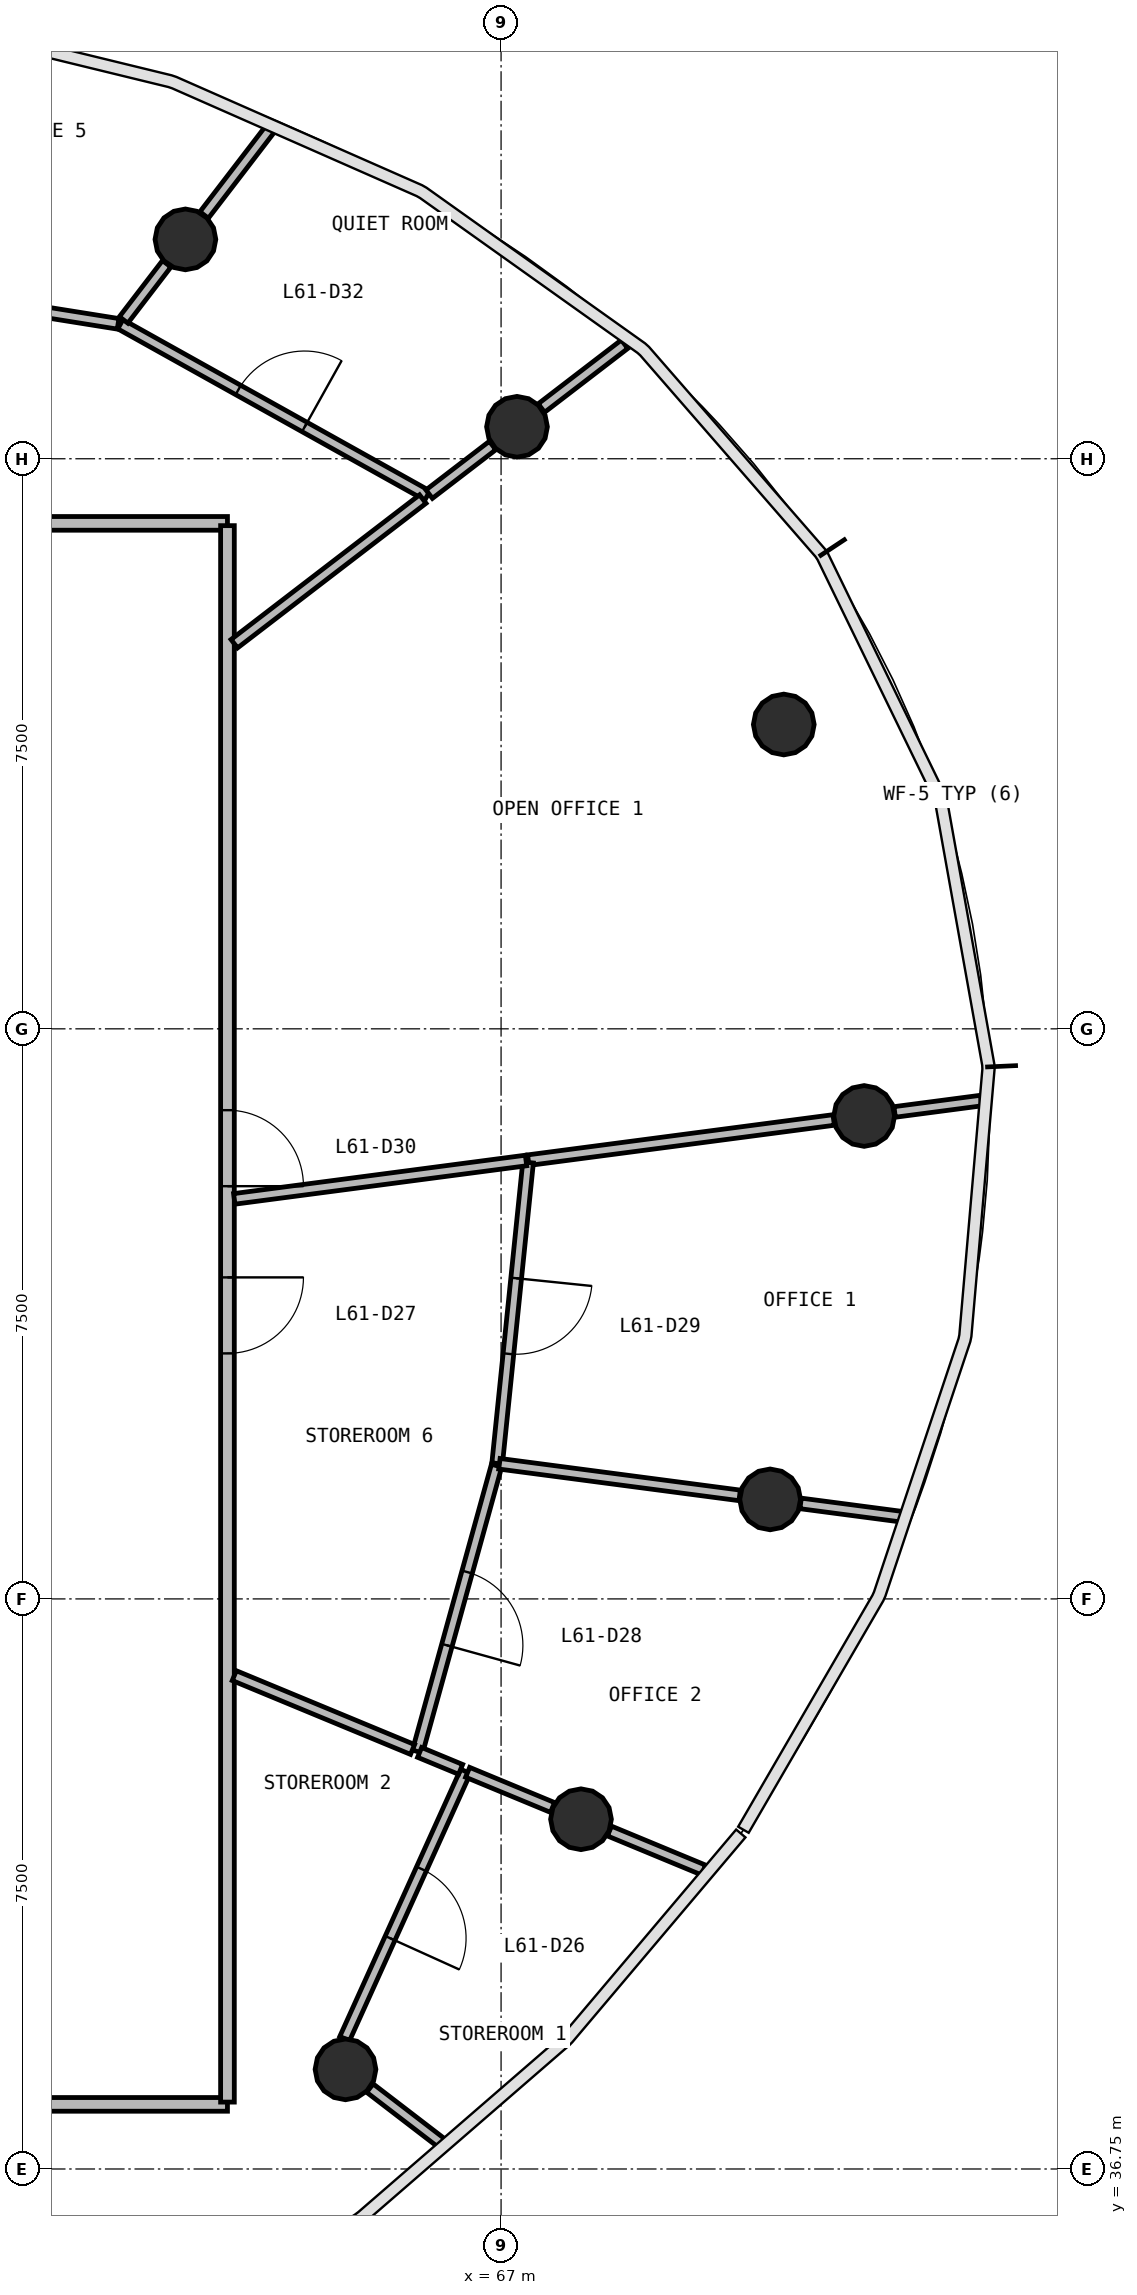
"""IFC4 building model, lengths in metres.
Left out: names, types, materials, properties, quantities, classifications, styles, units other than length and angle.
Written with IfcOpenShell. Run it as: python <this file> out.ifc"""

import sys

from ifc_helpers import new_model, si_unit, direction, frame, frame_2d, origin, origin_2d, place, context, subcontext, project, spatial, rectangle, circle, extrude, source, transform, mapped, element, fill, save


model = new_model("IFC4")
c1 = context("Model", 3, precision=1e-05, world=origin(), true_north=direction((0.0, 1.0)))
c2 = subcontext(c1, "Body", "Model", "MODEL_VIEW")
j1 = project(units=[si_unit("LENGTHUNIT", "METRE"), si_unit("PLANEANGLEUNIT", "RADIAN")], contexts=[c1])
p1 = place(None, origin())
s1 = spatial("IfcSite", under=j1, at=p1, CompositionType="ELEMENT")
p2 = place(p1, origin())
s2 = spatial("IfcBuilding", under=s1, at=p2, CompositionType="ELEMENT")
p3 = place(p2, frame((0.0, 0.0, 250.1)))
s3 = spatial("IfcBuildingStorey", under=s2, at=p3, CompositionType="ELEMENT", Elevation=250.1)
m1 = source(origin(), c2, "Body", "SweptSolid", [
    extrude(circle(Radius=0.4, at=origin_2d()), origin(), (0.0, 0.0, 1.0), 3.9),
])
for number, where, z_axis, x_axis in (
    (1, (71.777, 50.604, 0.0), (0.0, 0.0, 1.0), (1.0, 0.0, 0.0)),
    (2, (70.719, 55.754, 0.0), (0.0, 0.0, 1.0), (1.0, 0.0, 0.0)),
    (3, (67.209, 59.671, 0.0), (0.0, 0.0, 1.0), (1.0, 0.0, 0.0)),
    (4, (62.847, 62.136, 0.0), (0.0, 0.0, 1.0), (1.0, 0.0, 0.0)),
    (5, (64.953, 38.061, 0.0), (0.0, 0.0, 1.0), (1.0, 0.0, 0.0)),
    (6, (68.052, 41.351, 0.0), (0.0, 0.0, 1.0), (1.0, 0.0, 0.0)),
    (7, (70.54, 45.559, 0.0), (0.0, 0.0, 1.0), (1.0, 0.0, 0.0)),
):
    element("IfcColumn", number, at=place(p3, frame(where, z_axis=z_axis, x_axis=x_axis)), inside=s3, PredefinedType="COLUMN", context=c2, shape_type="MappedRepresentation", body=[
        mapped(m1, transform((0.0, 0.0, 0.0), scale=1.0)),
    ])
p4 = place(p3, frame((40.6, 58.4, 0.0), z_axis=(0.0, 0.0, 1.0), x_axis=(1.0, 0.0, 0.0)))
e8 = element("IfcWall", 8, at=p4, inside=s3, PredefinedType="PARTITIONING", context=c2, shape_type="SweptSolid", body=[
    extrude(rectangle(XDim=22.8, YDim=0.18, at=frame_2d((11.4, 0.0))), origin(), (0.0, 0.0, 1.0), 2.88),
])
p5 = place(p4, frame((16.15, 0.0, 0.0)))
e9 = element("IfcOpeningElement", 9, at=p5, cuts=e8, PredefinedType="OPENING", context=c2, shape_type="SweptSolid", body=[
    extrude(rectangle(XDim=1.0, YDim=2.1, at=frame_2d((0.5, 1.05))), frame((0.0, 0.1, 0.0), z_axis=(0.0, -1.0, 0.0), x_axis=(1.0, 0.0, 0.0)), (0.0, 0.0, 1.0), 0.2),
])
p6 = place(p4, frame((10.95, 0.0, 0.0)))
e10 = element("IfcOpeningElement", 10, at=p6, cuts=e8, PredefinedType="OPENING", context=c2, shape_type="SweptSolid", body=[
    extrude(rectangle(XDim=1.0, YDim=2.1, at=frame_2d((0.5, 1.05))), frame((0.0, 0.1, 0.0), z_axis=(0.0, -1.0, 0.0), x_axis=(1.0, 0.0, 0.0)), (0.0, 0.0, 1.0), 0.2),
])
p7 = place(p4, frame((8.75, 0.0, 0.0)))
e11 = element("IfcOpeningElement", 11, at=p7, cuts=e8, PredefinedType="OPENING", context=c2, shape_type="SweptSolid", body=[
    extrude(rectangle(XDim=1.0, YDim=2.1, at=frame_2d((0.5, 1.05))), frame((0.0, 0.1, 0.0), z_axis=(0.0, -1.0, 0.0), x_axis=(1.0, 0.0, 0.0)), (0.0, 0.0, 1.0), 0.2),
])
p8 = place(p3, frame((63.4, 37.6, 0.0), z_axis=(0.0, 0.0, 1.0), x_axis=(-1.0, 0.0, 0.0)))
e12 = element("IfcWall", 12, at=p8, inside=s3, PredefinedType="PARTITIONING", context=c2, shape_type="SweptSolid", body=[
    extrude(rectangle(XDim=22.8, YDim=0.18, at=frame_2d((11.4, 0.0))), origin(), (0.0, 0.0, 1.0), 2.88),
])
p9 = place(p8, frame((19.95, 0.0, 0.0)))
e13 = element("IfcOpeningElement", 13, at=p9, cuts=e12, PredefinedType="OPENING", context=c2, shape_type="SweptSolid", body=[
    extrude(rectangle(XDim=1.0, YDim=2.1, at=frame_2d((0.5, 1.05))), frame((0.0, 0.1, 0.0), z_axis=(0.0, -1.0, 0.0), x_axis=(1.0, 0.0, 0.0)), (0.0, 0.0, 1.0), 0.2),
])
p10 = place(p8, frame((10.95, 0.0, 0.0)))
e14 = element("IfcOpeningElement", 14, at=p10, cuts=e12, PredefinedType="OPENING", context=c2, shape_type="SweptSolid", body=[
    extrude(rectangle(XDim=1.0, YDim=2.1, at=frame_2d((0.5, 1.05))), frame((0.0, 0.1, 0.0), z_axis=(0.0, -1.0, 0.0), x_axis=(1.0, 0.0, 0.0)), (0.0, 0.0, 1.0), 0.2),
])
p11 = place(p8, frame((5.75, 0.0, 0.0)))
e15 = element("IfcOpeningElement", 15, at=p11, cuts=e12, PredefinedType="OPENING", context=c2, shape_type="SweptSolid", body=[
    extrude(rectangle(XDim=1.0, YDim=2.1, at=frame_2d((0.5, 1.05))), frame((0.0, 0.1, 0.0), z_axis=(0.0, -1.0, 0.0), x_axis=(1.0, 0.0, 0.0)), (0.0, 0.0, 1.0), 0.2),
])
p12 = place(p3, frame((63.4, 58.37, 0.0), z_axis=(0.0, 0.0, 1.0), x_axis=(0.0, -1.0, 0.0)))
e16 = element("IfcWall", 16, at=p12, inside=s3, PredefinedType="PARTITIONING", context=c2, shape_type="SweptSolid", body=[
    extrude(rectangle(XDim=20.74, YDim=0.18, at=frame_2d((10.37, 0.0))), origin(), (0.0, 0.0, 1.0), 2.88),
])
p13 = place(p12, frame((9.89, 0.0, 0.0)))
e17 = element("IfcOpeningElement", 17, at=p13, cuts=e16, PredefinedType="OPENING", context=c2, shape_type="SweptSolid", body=[
    extrude(rectangle(XDim=1.0, YDim=2.1, at=frame_2d((0.5, 1.05))), frame((0.0, 0.1, 0.0), z_axis=(0.0, -1.0, 0.0), x_axis=(1.0, 0.0, 0.0)), (0.0, 0.0, 1.0), 0.2),
])
p14 = place(p12, frame((7.69, 0.0, 0.0)))
e18 = element("IfcOpeningElement", 18, at=p14, cuts=e16, PredefinedType="OPENING", context=c2, shape_type="SweptSolid", body=[
    extrude(rectangle(XDim=1.0, YDim=2.1, at=frame_2d((0.5, 1.05))), frame((0.0, 0.1, 0.0), z_axis=(0.0, -1.0, 0.0), x_axis=(1.0, 0.0, 0.0)), (0.0, 0.0, 1.0), 0.2),
])
p15 = place(p3, frame((61.991, 61.02, 0.0), z_axis=(0.0, 0.0, 1.0), x_axis=(0.873219638233, -0.487326854795, 0.0)))
e19 = element("IfcWall", 19, at=p15, inside=s3, PredefinedType="PARTITIONING", context=c2, shape_type="SweptSolid", body=[
    extrude(rectangle(XDim=4.626, YDim=0.14, at=frame_2d((2.313, 0.0))), origin(), (0.0, 0.0, 1.0), 2.88),
])
p16 = place(p15, frame((1.776, 0.0, 0.0)))
e20 = element("IfcOpeningElement", 20, at=p16, cuts=e19, PredefinedType="OPENING", context=c2, shape_type="SweptSolid", body=[
    extrude(rectangle(XDim=1.0, YDim=2.1, at=frame_2d((0.5, 1.05))), frame((0.0, 0.08, 0.0), z_axis=(0.0, -1.0, 0.0), x_axis=(1.0, 0.0, 0.0)), (0.0, 0.0, 1.0), 0.16),
])
p17 = place(p3, frame((57.678, 61.709, 0.0), z_axis=(0.0, 0.0, 1.0), x_axis=(0.987490815334, -0.157676534816, 0.0)))
e21 = element("IfcWall", 21, at=p17, inside=s3, PredefinedType="PARTITIONING", context=c2, shape_type="SweptSolid", body=[
    extrude(rectangle(XDim=4.337, YDim=0.14, at=frame_2d((2.168, 0.0))), origin(), (0.0, 0.0, 1.0), 2.88),
])
p18 = place(p17, frame((1.687, 0.0, 0.0)))
e22 = element("IfcOpeningElement", 22, at=p18, cuts=e21, PredefinedType="OPENING", context=c2, shape_type="SweptSolid", body=[
    extrude(rectangle(XDim=1.0, YDim=2.1, at=frame_2d((0.5, 1.05))), frame((0.0, 0.08, 0.0), z_axis=(0.0, -1.0, 0.0), x_axis=(1.0, 0.0, 0.0)), (0.0, 0.0, 1.0), 0.16),
])
p19 = place(p3, frame((67.358, 50.022, 0.0), z_axis=(0.0, 0.0, 1.0), x_axis=(0.991449578653, 0.130490355919, 0.0)))
e23 = element("IfcWall", 23, at=p19, inside=s3, PredefinedType="PARTITIONING", context=c2, shape_type="SweptSolid", body=[
    extrude(rectangle(XDim=4.052, YDim=0.14, at=frame_2d((2.026, 0.0))), origin(), (0.0, 0.0, 1.0), 2.88),
])
p20 = place(p3, frame((67.355, 49.992, 0.0), z_axis=(0.0, 0.0, 1.0), x_axis=(-0.102108226225, -0.99477329585, 0.0)))
e24 = element("IfcWall", 24, at=p20, inside=s3, PredefinedType="PARTITIONING", context=c2, shape_type="SweptSolid", body=[
    extrude(rectangle(XDim=3.981, YDim=0.14, at=frame_2d((1.99, 0.0))), origin(), (0.0, 0.0, 1.0), 2.88),
])
p21 = place(p20, frame((1.531, 0.0, 0.0)))
e25 = element("IfcOpeningElement", 25, at=p21, cuts=e24, PredefinedType="OPENING", context=c2, shape_type="SweptSolid", body=[
    extrude(rectangle(XDim=1.0, YDim=2.1, at=frame_2d((0.5, 1.05))), frame((0.0, 0.08, 0.0), z_axis=(0.0, -1.0, 0.0), x_axis=(1.0, 0.0, 0.0)), (0.0, 0.0, 1.0), 0.16),
])
p22 = place(p3, frame((63.49, 49.513, 0.0), z_axis=(0.0, 0.0, 1.0), x_axis=(0.991444634679, 0.130527914125, 0.0)))
e26 = element("IfcWall", 26, at=p22, inside=s3, PredefinedType="PARTITIONING", context=c2, shape_type="SweptSolid", body=[
    extrude(rectangle(XDim=3.872, YDim=0.14, at=frame_2d((1.936, 0.0))), origin(), (0.0, 0.0, 1.0), 2.88),
])
p23 = place(p3, frame((66.941, 46.003, 0.0), z_axis=(0.0, 0.0, 1.0), x_axis=(-0.266530407872, -0.963826510156, 0.0)))
e27 = element("IfcWall", 27, at=p23, inside=s3, PredefinedType="PARTITIONING", context=c2, shape_type="SweptSolid", body=[
    extrude(rectangle(XDim=3.902, YDim=0.14, at=frame_2d((1.951, 0.0))), origin(), (0.0, 0.0, 1.0), 2.88),
])
p24 = place(p23, frame((1.452, 0.0, 0.0)))
e28 = element("IfcOpeningElement", 28, at=p24, cuts=e27, PredefinedType="OPENING", context=c2, shape_type="SweptSolid", body=[
    extrude(rectangle(XDim=1.0, YDim=2.1, at=frame_2d((0.5, 1.05))), frame((0.0, 0.08, 0.0), z_axis=(0.0, -1.0, 0.0), x_axis=(1.0, 0.0, 0.0)), (0.0, 0.0, 1.0), 0.16),
])
p25 = place(p3, frame((66.532, 41.98, 0.0), z_axis=(0.0, 0.0, 1.0), x_axis=(-0.412147858133, -0.911116975496, 0.0)))
e29 = element("IfcWall", 29, at=p25, inside=s3, PredefinedType="PARTITIONING", context=c2, shape_type="SweptSolid", body=[
    extrude(rectangle(XDim=3.858, YDim=0.14, at=frame_2d((1.929, 0.0))), origin(), (0.0, 0.0, 1.0), 2.88),
])
p26 = place(p25, frame((1.408, 0.0, 0.0)))
e30 = element("IfcOpeningElement", 30, at=p26, cuts=e29, PredefinedType="OPENING", context=c2, shape_type="SweptSolid", body=[
    extrude(rectangle(XDim=1.0, YDim=2.1, at=frame_2d((0.5, 1.05))), frame((0.0, 0.08, 0.0), z_axis=(0.0, -1.0, 0.0), x_axis=(1.0, 0.0, 0.0)), (0.0, 0.0, 1.0), 0.16),
])
p27 = place(p3, frame((63.49, 56.817, 0.0), z_axis=(0.0, 0.0, 1.0), x_axis=(0.79337248494, 0.608736478404, 0.0)))
e31 = element("IfcWall", 31, at=p27, inside=s3, PredefinedType="PARTITIONING", context=c2, shape_type="SweptSolid", body=[
    extrude(rectangle(XDim=3.126, YDim=0.14, at=frame_2d((1.563, 0.0))), origin(), (0.0, 0.0, 1.0), 2.88),
])
p28 = place(p3, frame((66.979, 46.028, 0.0), z_axis=(0.0, 0.0, 1.0), x_axis=(0.991447255609, -0.13050800491, 0.0)))
e32 = element("IfcWall", 32, at=p28, inside=s3, PredefinedType="PARTITIONING", context=c2, shape_type="SweptSolid", body=[
    extrude(rectangle(XDim=3.188, YDim=0.14, at=frame_2d((1.594, 0.0))), origin(), (0.0, 0.0, 1.0), 2.88),
])
p29 = place(p3, frame((63.49, 43.241, 0.0), z_axis=(0.0, 0.0, 1.0), x_axis=(0.923857420899, -0.382736810157, 0.0)))
e33 = element("IfcWall", 33, at=p29, inside=s3, PredefinedType="PARTITIONING", context=c2, shape_type="SweptSolid", body=[
    extrude(rectangle(XDim=2.539, YDim=0.14, at=frame_2d((1.27, 0.0))), origin(), (0.0, 0.0, 1.0), 2.88),
])
p30 = place(p3, frame((63.093, 62.457, 0.0), z_axis=(0.0, 0.0, 1.0), x_axis=(0.608682974902, 0.793413534082, 0.0)))
e34 = element("IfcWall", 34, at=p30, inside=s3, PredefinedType="PARTITIONING", context=c2, shape_type="SweptSolid", body=[
    extrude(rectangle(XDim=1.447, YDim=0.14, at=frame_2d((0.724, 0.0))), origin(), (0.0, 0.0, 1.0), 2.88),
])
p31 = place(p3, frame((67.531, 59.917, 0.0), z_axis=(0.0, 0.0, 1.0), x_axis=(0.793347091369, 0.608769572676, 0.0)))
e35 = element("IfcWall", 35, at=p31, inside=s3, PredefinedType="PARTITIONING", context=c2, shape_type="SweptSolid", body=[
    extrude(rectangle(XDim=1.38, YDim=0.14, at=frame_2d((0.69, 0.0))), origin(), (0.0, 0.0, 1.0), 2.88),
])
p32 = place(p3, frame((70.941, 45.506, 0.0), z_axis=(0.0, 0.0, 1.0), x_axis=(0.991453684747, -0.130459154536, 0.0)))
e36 = element("IfcWall", 36, at=p32, inside=s3, PredefinedType="PARTITIONING", context=c2, shape_type="SweptSolid", body=[
    extrude(rectangle(XDim=1.361, YDim=0.14, at=frame_2d((0.68, 0.0))), origin(), (0.0, 0.0, 1.0), 2.88),
])
p33 = place(p3, frame((68.426, 41.196, 0.0), z_axis=(0.0, 0.0, 1.0), x_axis=(0.923888145957, -0.382662637005, 0.0)))
e37 = element("IfcWall", 37, at=p33, inside=s3, PredefinedType="PARTITIONING", context=c2, shape_type="SweptSolid", body=[
    extrude(rectangle(XDim=1.341, YDim=0.14, at=frame_2d((0.67, 0.0))), origin(), (0.0, 0.0, 1.0), 2.88),
])
p34 = place(p3, frame((66.56, 41.969, 0.0), z_axis=(0.0, 0.0, 1.0), x_axis=(0.923839645741, -0.382779713358, 0.0)))
e38 = element("IfcWall", 38, at=p34, inside=s3, PredefinedType="PARTITIONING", context=c2, shape_type="SweptSolid", body=[
    extrude(rectangle(XDim=1.209, YDim=0.14, at=frame_2d((0.604, 0.0))), origin(), (0.0, 0.0, 1.0), 2.88),
])
p35 = place(p3, frame((65.274, 37.814, 0.0), z_axis=(0.0, 0.0, 1.0), x_axis=(0.793454460627, -0.608629623754, 0.0)))
e39 = element("IfcWall", 39, at=p35, inside=s3, PredefinedType="PARTITIONING", context=c2, shape_type="SweptSolid", body=[
    extrude(rectangle(XDim=1.19, YDim=0.14, at=frame_2d((0.595, 0.0))), origin(), (0.0, 0.0, 1.0), 2.88),
])
p36 = place(p3, frame((72.178, 50.656, 0.0), z_axis=(0.0, 0.0, 1.0), x_axis=(0.991431107299, 0.130630622292, 0.0)))
e40 = element("IfcWall", 40, at=p36, inside=s3, PredefinedType="PARTITIONING", context=c2, shape_type="SweptSolid", body=[
    extrude(rectangle(XDim=1.147, YDim=0.14, at=frame_2d((0.574, 0.0))), origin(), (0.0, 0.0, 1.0), 2.88),
])
p37 = place(p3, frame((66.054, 58.784, 0.0), z_axis=(0.0, 0.0, 1.0), x_axis=(0.793348442071, 0.608767812441, 0.0)))
e41 = element("IfcWall", 41, at=p37, inside=s3, PredefinedType="PARTITIONING", context=c2, shape_type="SweptSolid", body=[
    extrude(rectangle(XDim=1.052, YDim=0.14, at=frame_2d((0.526, 0.0))), origin(), (0.0, 0.0, 1.0), 2.88),
])
p38 = place(p3, frame((62.034, 61.076, 0.0), z_axis=(0.0, 0.0, 1.0), x_axis=(0.608734333178, 0.793374130919, 0.0)))
e42 = element("IfcWall", 42, at=p38, inside=s3, PredefinedType="PARTITIONING", context=c2, shape_type="SweptSolid", body=[
    extrude(rectangle(XDim=0.931, YDim=0.14, at=frame_2d((0.465, 0.0))), origin(), (0.0, 0.0, 1.0), 2.88),
])
p39 = place(p3, frame((65.928, 42.231, 0.0), z_axis=(0.0, 0.0, 1.0), x_axis=(0.923817916436, -0.382832152871, 0.0)))
e43 = element("IfcWall", 43, at=p39, inside=s3, PredefinedType="PARTITIONING", context=c2, shape_type="SweptSolid", body=[
    extrude(rectangle(XDim=0.583, YDim=0.14, at=frame_2d((0.292, 0.0))), origin(), (0.0, 0.0, 1.0), 2.88),
])
m2 = source(origin(), c2, "Body", "SweptSolid", [
    extrude(rectangle(XDim=1.0, YDim=2.1, at=frame_2d((0.5, 1.05))), frame((0.0, 0.025, 0.0), z_axis=(0.0, -1.0, 0.0), x_axis=(1.0, 0.0, 0.0)), (0.0, 0.0, 1.0), 0.05),
])
p40 = place(p26, origin())
e44 = element("IfcDoor", 44, at=p40, inside=s3, OperationType="SINGLE_SWING_RIGHT", PredefinedType="DOOR", context=c2, shape_type="MappedRepresentation", body=[
    mapped(m2, transform((0.0, 0.0, 0.0), scale=1.0)),
])
fill(e30, e44)
p41 = place(p13, origin())
e45 = element("IfcDoor", 45, at=p41, inside=s3, OperationType="SINGLE_SWING_LEFT", PredefinedType="DOOR", context=c2, shape_type="MappedRepresentation", body=[
    mapped(m2, transform((0.0, 0.0, 0.0), scale=1.0)),
])
fill(e17, e45)
p42 = place(p24, origin())
e46 = element("IfcDoor", 46, at=p42, inside=s3, OperationType="SINGLE_SWING_RIGHT", PredefinedType="DOOR", context=c2, shape_type="MappedRepresentation", body=[
    mapped(m2, transform((0.0, 0.0, 0.0), scale=1.0)),
])
fill(e28, e46)
p43 = place(p21, origin())
e47 = element("IfcDoor", 47, at=p43, inside=s3, OperationType="SINGLE_SWING_LEFT", PredefinedType="DOOR", context=c2, shape_type="MappedRepresentation", body=[
    mapped(m2, transform((0.0, 0.0, 0.0), scale=1.0)),
])
fill(e25, e47)
p44 = place(p14, origin())
e48 = element("IfcDoor", 48, at=p44, inside=s3, OperationType="SINGLE_SWING_RIGHT", PredefinedType="DOOR", context=c2, shape_type="MappedRepresentation", body=[
    mapped(m2, transform((0.0, 0.0, 0.0), scale=1.0)),
])
fill(e18, e48)
p45 = place(p16, origin())
e49 = element("IfcDoor", 49, at=p45, inside=s3, OperationType="SINGLE_SWING_RIGHT", PredefinedType="DOOR", context=c2, shape_type="MappedRepresentation", body=[
    mapped(m2, transform((0.0, 0.0, 0.0), scale=1.0)),
])
fill(e20, e49)
save(model, sys.argv[1])
